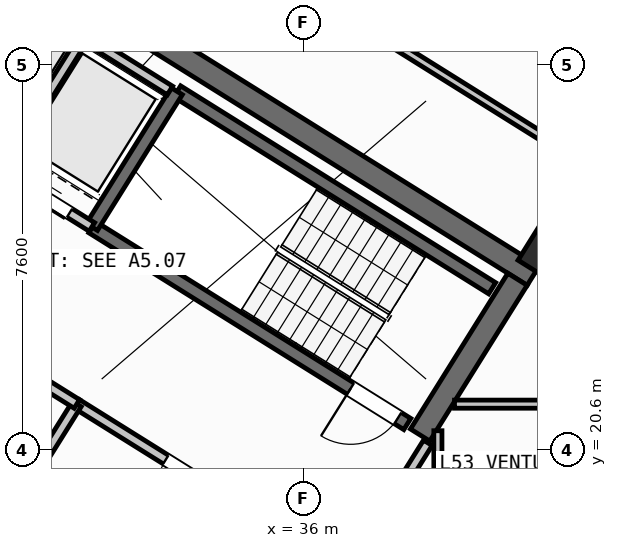
"""IFC4 building model, lengths in metres.
Left out: names, types, materials, properties, quantities, classifications, styles, units other than length and angle.
Written with IfcOpenShell. Run it as: python <this file> out.ifc"""

import sys

from ifc_helpers import new_model, si_unit, direction, frame, frame_2d, origin, origin_2d, place, context, subcontext, project, spatial, rectangle, hollow_rectangle, extrude, source, transform, mapped, element, fill, save


model = new_model("IFC4")
c1 = context("Model", 3, precision=1e-05, world=origin(), true_north=direction((0.0, 1.0)))
c2 = subcontext(c1, "Body", "Model", "MODEL_VIEW")
j1 = project(units=[si_unit("LENGTHUNIT", "METRE"), si_unit("PLANEANGLEUNIT", "RADIAN")], contexts=[c1])
p1 = place(None, origin())
s1 = spatial("IfcSite", under=j1, at=p1, CompositionType="ELEMENT")
p2 = place(p1, origin())
s2 = spatial("IfcBuilding", under=s1, at=p2, CompositionType="ELEMENT")
p3 = place(p2, frame((0.0, 0.0, 211.2)))
s3 = spatial("IfcBuildingStorey", under=s2, at=p3, CompositionType="ELEMENT", Elevation=211.2)
p4 = place(p3, frame((40.531, 24.036, 0.0), z_axis=(0.0, 0.0, 1.0), x_axis=(-0.848048787466, 0.529918157905, 0.0)))
e1 = element("IfcWall", 1, at=p4, inside=s3, PredefinedType="SHEAR", context=c2, shape_type="SweptSolid", body=[
    extrude(rectangle(XDim=13.04, YDim=0.45, at=frame_2d((6.52, 0.0))), origin(), (0.0, 0.0, 1.0), 3.35),
])
p5 = place(p3, frame((40.221, 23.965, 0.0), z_axis=(0.0, 0.0, 1.0), x_axis=(-0.529902075036, -0.848058836916, 0.0)))
e2 = element("IfcWall", 2, at=p5, inside=s3, PredefinedType="SHEAR", context=c2, shape_type="SweptSolid", body=[
    extrude(rectangle(XDim=3.625, YDim=0.45, at=frame_2d((1.812, 0.0))), origin(), (0.0, 0.0, 1.0), 3.35),
])
m1 = source(origin(), c2, "Body", "SweptSolid", [
    extrude(hollow_rectangle(XDim=0.8, YDim=0.8, WallThickness=0.032, at=origin_2d()), origin(), (0.0, 0.0, 1.0), 3.6),
])
p6 = place(p3, frame((40.783, 24.469, 0.0), z_axis=(0.0, 0.0, 1.0), x_axis=(-0.848048096156, 0.529919264233, 0.0)))
e3 = element("IfcColumn", 3, at=p6, inside=s3, PredefinedType="COLUMN", context=c2, shape_type="MappedRepresentation", body=[
    mapped(m1, transform((0.0, 0.0, 0.0), scale=1.0)),
])
p7 = place(p3, frame((31.76, 12.183, 0.0), z_axis=(0.0, 0.0, 1.0), x_axis=(-0.848047074256, 0.529920899612, 0.0)))
e4 = element("IfcWall", 4, at=p7, inside=s3, PredefinedType="STANDARD", context=c2, shape_type="SweptSolid", body=[
    extrude(rectangle(XDim=30.652, YDim=0.32, at=frame_2d((15.326, 0.0))), origin(), (0.0, 0.0, 1.0), 3.35),
])
p8 = place(p7, frame((15.166, 0.0, 0.0)))
e5 = element("IfcOpeningElement", 5, at=p8, cuts=e4, PredefinedType="OPENING", context=c2, shape_type="SweptSolid", body=[
    extrude(rectangle(XDim=1.2, YDim=2.15, at=frame_2d((0.6, 1.075))), frame((0.0, 0.17, 0.0), z_axis=(0.0, -1.0, 0.0), x_axis=(1.0, 0.0, 0.0)), (0.0, 0.0, 1.0), 0.34),
])
p9 = place(p7, frame((2.24, 0.0, 0.9)))
e6 = element("IfcOpeningElement", 6, at=p9, cuts=e4, PredefinedType="OPENING", context=c2, shape_type="SweptSolid", body=[
    extrude(rectangle(XDim=1.65, YDim=1.45, at=frame_2d((0.825, 0.725))), frame((0.0, 0.17, 0.0), z_axis=(0.0, -1.0, 0.0), x_axis=(1.0, 0.0, 0.0)), (0.0, 0.0, 1.0), 0.34),
])
p10 = place(p7, frame((7.469, 0.0, 0.9)))
e7 = element("IfcOpeningElement", 7, at=p10, cuts=e4, PredefinedType="OPENING", context=c2, shape_type="SweptSolid", body=[
    extrude(rectangle(XDim=1.65, YDim=1.45, at=frame_2d((0.825, 0.725))), frame((0.0, 0.17, 0.0), z_axis=(0.0, -1.0, 0.0), x_axis=(1.0, 0.0, 0.0)), (0.0, 0.0, 1.0), 0.34),
])
p11 = place(p7, frame((12.623, 0.0, 1.0)))
e8 = element("IfcOpeningElement", 8, at=p11, cuts=e4, PredefinedType="OPENING", context=c2, shape_type="SweptSolid", body=[
    extrude(rectangle(XDim=0.9, YDim=1.25, at=frame_2d((0.45, 0.625))), frame((0.0, 0.17, 0.0), z_axis=(0.0, -1.0, 0.0), x_axis=(1.0, 0.0, 0.0)), (0.0, 0.0, 1.0), 0.34),
])
p12 = place(p7, frame((19.715, 0.0, 1.0)))
e9 = element("IfcOpeningElement", 9, at=p12, cuts=e4, PredefinedType="OPENING", context=c2, shape_type="SweptSolid", body=[
    extrude(rectangle(XDim=0.9, YDim=1.25, at=frame_2d((0.45, 0.625))), frame((0.0, 0.17, 0.0), z_axis=(0.0, -1.0, 0.0), x_axis=(1.0, 0.0, 0.0)), (0.0, 0.0, 1.0), 0.34),
])
p13 = place(p7, frame((25.566, 0.0, 0.9)))
e10 = element("IfcOpeningElement", 10, at=p13, cuts=e4, PredefinedType="OPENING", context=c2, shape_type="SweptSolid", body=[
    extrude(rectangle(XDim=1.65, YDim=1.45, at=frame_2d((0.825, 0.725))), frame((0.0, 0.17, 0.0), z_axis=(0.0, -1.0, 0.0), x_axis=(1.0, 0.0, 0.0)), (0.0, 0.0, 1.0), 0.34),
])
p14 = place(p7, frame((28.896, 0.0, 1.0)))
e11 = element("IfcOpeningElement", 11, at=p14, cuts=e4, PredefinedType="OPENING", context=c2, shape_type="SweptSolid", body=[
    extrude(rectangle(XDim=0.9, YDim=1.25, at=frame_2d((0.45, 0.625))), frame((0.0, 0.17, 0.0), z_axis=(0.0, -1.0, 0.0), x_axis=(1.0, 0.0, 0.0)), (0.0, 0.0, 1.0), 0.34),
])
p15 = place(p3, frame((31.28, 18.261, 0.0), z_axis=(0.0, 0.0, 1.0), x_axis=(-0.848051618787, 0.529913626805, 0.0)))
e12 = element("IfcWall", 12, at=p15, inside=s3, PredefinedType="SHEAR", context=c2, shape_type="SweptSolid", body=[
    extrude(rectangle(XDim=7.46, YDim=0.26, at=frame_2d((3.73, 0.0))), origin(), (0.0, 0.0, 1.0), 3.35),
])
p16 = place(p15, frame((0.36, 0.0, 0.0)))
e13 = element("IfcOpeningElement", 13, at=p16, cuts=e12, PredefinedType="OPENING", context=c2, shape_type="SweptSolid", body=[
    extrude(rectangle(XDim=0.86, YDim=2.05, at=frame_2d((0.43, 1.025))), frame((0.0, 0.14, 0.0), z_axis=(0.0, -1.0, 0.0), x_axis=(1.0, 0.0, 0.0)), (0.0, 0.0, 1.0), 0.28),
])
p17 = place(p3, frame((39.721, 23.788, 0.0), z_axis=(0.0, 0.0, 1.0), x_axis=(-0.848054434086, 0.529909121291, 0.0)))
e14 = element("IfcWall", 14, at=p17, inside=s3, PredefinedType="SHEAR", context=c2, shape_type="SweptSolid", body=[
    extrude(rectangle(XDim=7.33, YDim=0.26, at=frame_2d((3.665, 0.0))), origin(), (0.0, 0.0, 1.0), 3.35),
])
p18 = place(p3, frame((38.046, 21.108, 0.0), z_axis=(0.0, 0.0, 1.0), x_axis=(-0.848054434086, 0.529909121291, 0.0)))
e15 = element("IfcWall", 15, at=p18, inside=s3, PredefinedType="SHEAR", context=c2, shape_type="SweptSolid", body=[
    extrude(rectangle(XDim=7.33, YDim=0.26, at=frame_2d((3.665, 0.0))), origin(), (0.0, 0.0, 1.0), 3.35),
])
p19 = place(p18, frame((0.22, 0.0, 0.0)))
e16 = element("IfcOpeningElement", 16, at=p19, cuts=e15, PredefinedType="OPENING", context=c2, shape_type="SweptSolid", body=[
    extrude(rectangle(XDim=1.1, YDim=2.1, at=frame_2d((0.55, 1.05))), frame((0.0, 0.14, 0.0), z_axis=(0.0, -1.0, 0.0), x_axis=(1.0, 0.0, 0.0)), (0.0, 0.0, 1.0), 0.28),
])
p20 = place(p3, frame((33.496, 27.677, 0.0), z_axis=(0.0, 0.0, 1.0), x_axis=(-0.529908658664, -0.84805472316, 0.0)))
e17 = element("IfcWall", 17, at=p20, inside=s3, PredefinedType="SHEAR", context=c2, shape_type="SweptSolid", body=[
    extrude(rectangle(XDim=3.16, YDim=0.26, at=frame_2d((1.58, 0.0))), origin(), (0.0, 0.0, 1.0), 3.35),
])
p21 = place(p3, frame((36.459, 18.421, 0.0), z_axis=(0.0, 0.0, 1.0), x_axis=(-0.848059591691, 0.529900867089, 0.0)))
e18 = element("IfcWall", 18, at=p21, inside=s3, PredefinedType="STANDARD", context=c2, shape_type="SweptSolid", body=[
    extrude(rectangle(XDim=5.818, YDim=0.2, at=frame_2d((2.909, 0.0))), origin(), (0.0, 0.0, 1.0), 3.34),
])
p22 = place(p21, frame((2.598, 0.0, 0.0)))
e19 = element("IfcOpeningElement", 19, at=p22, cuts=e18, PredefinedType="OPENING", context=c2, shape_type="SweptSolid", body=[
    extrude(rectangle(XDim=1.15, YDim=2.1, at=frame_2d((0.575, 1.05))), frame((0.0, 0.11, 0.0), z_axis=(0.0, -1.0, 0.0), x_axis=(1.0, 0.0, 0.0)), (0.0, 0.0, 1.0), 0.22),
])
p23 = place(p3, frame((31.822, 24.998, 0.0), z_axis=(0.0, 0.0, 1.0), x_axis=(-0.848054125777, 0.529909614701, 0.0)))
e20 = element("IfcWall", 20, at=p23, inside=s3, PredefinedType="STANDARD", context=c2, shape_type="SweptSolid", body=[
    extrude(rectangle(XDim=4.668, YDim=0.2, at=frame_2d((2.334, 0.0))), origin(), (0.0, 0.0, 1.0), 3.34),
])
p24 = place(p23, frame((0.52, 0.0, 0.0)))
e21 = element("IfcOpeningElement", 21, at=p24, cuts=e20, PredefinedType="OPENING", context=c2, shape_type="SweptSolid", body=[
    extrude(rectangle(XDim=1.2, YDim=2.15, at=frame_2d((0.6, 1.075))), frame((0.0, 0.11, 0.0), z_axis=(0.0, -1.0, 0.0), x_axis=(1.0, 0.0, 0.0)), (0.0, 0.0, 1.0), 0.22),
])
p25 = place(p23, frame((2.54, 0.0, 0.0)))
e22 = element("IfcOpeningElement", 22, at=p25, cuts=e20, PredefinedType="OPENING", context=c2, shape_type="SweptSolid", body=[
    extrude(rectangle(XDim=1.2, YDim=2.15, at=frame_2d((0.6, 1.075))), frame((0.0, 0.11, 0.0), z_axis=(0.0, -1.0, 0.0), x_axis=(1.0, 0.0, 0.0)), (0.0, 0.0, 1.0), 0.22),
])
p26 = place(p3, frame((31.645, 28.716, 0.0), z_axis=(0.0, 0.0, 1.0), x_axis=(-0.52986693015, -0.848080795876, 0.0)))
e23 = element("IfcWall", 23, at=p26, inside=s3, PredefinedType="STANDARD", context=c2, shape_type="SweptSolid", body=[
    extrude(rectangle(XDim=2.66, YDim=0.2, at=frame_2d((1.33, 0.0))), origin(), (0.0, 0.0, 1.0), 3.34),
])
p27 = place(p3, frame((33.363, 27.69, 0.0), z_axis=(0.0, 0.0, 1.0), x_axis=(-0.84804957148, 0.529916903215, 0.0)))
e24 = element("IfcWall", 24, at=p27, inside=s3, PredefinedType="STANDARD", context=c2, shape_type="SweptSolid", body=[
    extrude(rectangle(XDim=4.548, YDim=0.2, at=frame_2d((2.274, 0.0))), origin(), (0.0, 0.0, 1.0), 3.34),
])
p28 = place(p3, frame((31.525, 21.504, 0.0), z_axis=(0.0, 0.0, 1.0), x_axis=(-0.529907497854, -0.848055448493, 0.0)))
e25 = element("IfcWall", 25, at=p28, inside=s3, PredefinedType="STANDARD", context=c2, shape_type="SweptSolid", body=[
    extrude(rectangle(XDim=2.88, YDim=0.2, at=frame_2d((1.44, 0.0))), origin(), (0.0, 0.0, 1.0), 3.34),
])
p29 = place(p3, frame((31.525, 21.504, 0.0), z_axis=(0.0, 0.0, 1.0), x_axis=(-0.848042066329, 0.529928913853, 0.0)))
e26 = element("IfcWall", 26, at=p29, inside=s3, PredefinedType="STANDARD", context=c2, shape_type="SweptSolid", body=[
    extrude(rectangle(XDim=6.268, YDim=0.2, at=frame_2d((3.134, 0.0))), origin(), (0.0, 0.0, 1.0), 3.34),
])
p30 = place(p29, frame((4.4, 0.0, 0.0)))
e27 = element("IfcOpeningElement", 27, at=p30, cuts=e26, PredefinedType="OPENING", context=c2, shape_type="SweptSolid", body=[
    extrude(rectangle(XDim=0.86, YDim=2.05, at=frame_2d((0.43, 1.025))), frame((0.0, 0.11, 0.0), z_axis=(0.0, -1.0, 0.0), x_axis=(1.0, 0.0, 0.0)), (0.0, 0.0, 1.0), 0.22),
])
p31 = place(p29, frame((1.45, 0.0, 0.0)))
e28 = element("IfcOpeningElement", 28, at=p31, cuts=e26, PredefinedType="OPENING", context=c2, shape_type="SweptSolid", body=[
    extrude(rectangle(XDim=0.86, YDim=2.05, at=frame_2d((0.43, 1.025))), frame((0.0, 0.11, 0.0), z_axis=(0.0, -1.0, 0.0), x_axis=(1.0, 0.0, 0.0)), (0.0, 0.0, 1.0), 0.22),
])
p32 = place(p3, frame((31.239, 38.274, 0.0), z_axis=(0.0, 0.0, 1.0), x_axis=(-0.529925472745, -0.848044216616, 0.0)))
e29 = element("IfcWall", 29, at=p32, inside=s3, PredefinedType="PARTITIONING", context=c2, shape_type="SweptSolid", body=[
    extrude(rectangle(XDim=11.65, YDim=0.16, at=frame_2d((5.825, 0.0))), origin(), (0.0, 0.0, 1.0), 3.34),
])
p33 = place(p3, frame((41.936, 26.012, 0.0), z_axis=(0.0, 0.0, 1.0), x_axis=(-0.848051154596, 0.529914369676, 0.0)))
e30 = element("IfcWall", 30, at=p33, inside=s3, PredefinedType="PARTITIONING", context=c2, shape_type="SweptSolid", body=[
    extrude(rectangle(XDim=15.57, YDim=0.16, at=frame_2d((7.785, 0.0))), origin(), (0.0, 0.0, 1.0), 3.34),
])
p34 = place(p33, frame((10.83, 0.0, 0.0)))
e31 = element("IfcOpeningElement", 31, at=p34, cuts=e30, PredefinedType="OPENING", context=c2, shape_type="SweptSolid", body=[
    extrude(rectangle(XDim=1.0, YDim=2.1, at=frame_2d((0.5, 1.05))), frame((0.0, 0.09, 0.0), z_axis=(0.0, -1.0, 0.0), x_axis=(1.0, 0.0, 0.0)), (0.0, 0.0, 1.0), 0.18),
])
p35 = place(p3, frame((38.451, 20.737, 0.0), z_axis=(0.0, 0.0, 1.0), x_axis=(-0.529924799939, -0.848044637038, 0.0)))
e32 = element("IfcWall", 32, at=p35, inside=s3, PredefinedType="STANDARD", context=c2, shape_type="SweptSolid", body=[
    extrude(rectangle(XDim=2.96, YDim=0.2, at=frame_2d((1.48, 0.0))), origin(), (0.0, 0.0, 1.0), 3.34),
])
p36 = place(p35, frame((1.46, 0.0, 0.0)))
e33 = element("IfcOpeningElement", 33, at=p36, cuts=e32, PredefinedType="OPENING", context=c2, shape_type="SweptSolid", body=[
    extrude(rectangle(XDim=0.86, YDim=2.05, at=frame_2d((0.43, 1.025))), frame((0.0, 0.11, 0.0), z_axis=(0.0, -1.0, 0.0), x_axis=(1.0, 0.0, 0.0)), (0.0, 0.0, 1.0), 0.22),
])
p37 = place(p3, frame((38.65, 17.93, 0.0), z_axis=(0.0, 0.0, 1.0), x_axis=(0.0, 1.0, 0.0)))
e34 = element("IfcWall", 34, at=p37, inside=s3, PredefinedType="PARTITIONING", context=c2, shape_type="SweptSolid", body=[
    extrude(rectangle(XDim=3.046, YDim=0.16, at=frame_2d((1.523, 0.0))), origin(), (0.0, 0.0, 1.0), 3.34),
])
p38 = place(p3, frame((38.978, 21.5, 0.0), z_axis=(0.0, 0.0, 1.0), x_axis=(1.0, 0.0, 0.0)))
e35 = element("IfcWall", 35, at=p38, inside=s3, PredefinedType="PARTITIONING", context=c2, shape_type="SweptSolid", body=[
    extrude(rectangle(XDim=7.336, YDim=0.16, at=frame_2d((3.668, 0.0))), origin(), (0.0, 0.0, 1.0), 3.34),
])
m2 = source(origin(), c2, "Body", "SweptSolid", [
    extrude(rectangle(XDim=1.1, YDim=2.1, at=frame_2d((0.55, 1.05))), frame((0.0, 0.025, 0.0), z_axis=(0.0, -1.0, 0.0), x_axis=(1.0, 0.0, 0.0)), (0.0, 0.0, 1.0), 0.05),
])
p39 = place(p19, origin())
e36 = element("IfcDoor", 36, at=p39, inside=s3, OperationType="SINGLE_SWING_RIGHT", PredefinedType="DOOR", context=c2, shape_type="MappedRepresentation", body=[
    mapped(m2, transform((0.0, 0.0, 0.0), scale=1.0)),
])
fill(e16, e36)
m3 = source(origin(), c2, "Body", "SweptSolid", [
    extrude(rectangle(XDim=1.15, YDim=2.1, at=frame_2d((0.575, 1.05))), frame((0.0, 0.025, 0.0), z_axis=(0.0, -1.0, 0.0), x_axis=(1.0, 0.0, 0.0)), (0.0, 0.0, 1.0), 0.05),
])
p40 = place(p22, origin())
e37 = element("IfcDoor", 37, at=p40, inside=s3, OperationType="SINGLE_SWING_LEFT", PredefinedType="DOOR", context=c2, shape_type="MappedRepresentation", body=[
    mapped(m3, transform((0.0, 0.0, 0.0), scale=1.0)),
])
fill(e19, e37)
m4 = source(origin(), c2, "Body", "SweptSolid", [
    extrude(rectangle(XDim=1.2, YDim=2.15, at=frame_2d((0.6, 1.075))), frame((0.0, 0.025, 0.0), z_axis=(0.0, -1.0, 0.0), x_axis=(1.0, 0.0, 0.0)), (0.0, 0.0, 1.0), 0.05),
])
p41 = place(p24, origin())
e38 = element("IfcDoor", 38, at=p41, inside=s3, OperationType="DOUBLE_DOOR_SLIDING", PredefinedType="DOOR", context=c2, shape_type="MappedRepresentation", body=[
    mapped(m4, transform((0.0, 0.0, 0.0), scale=1.0)),
])
fill(e21, e38)
save(model, sys.argv[1])
